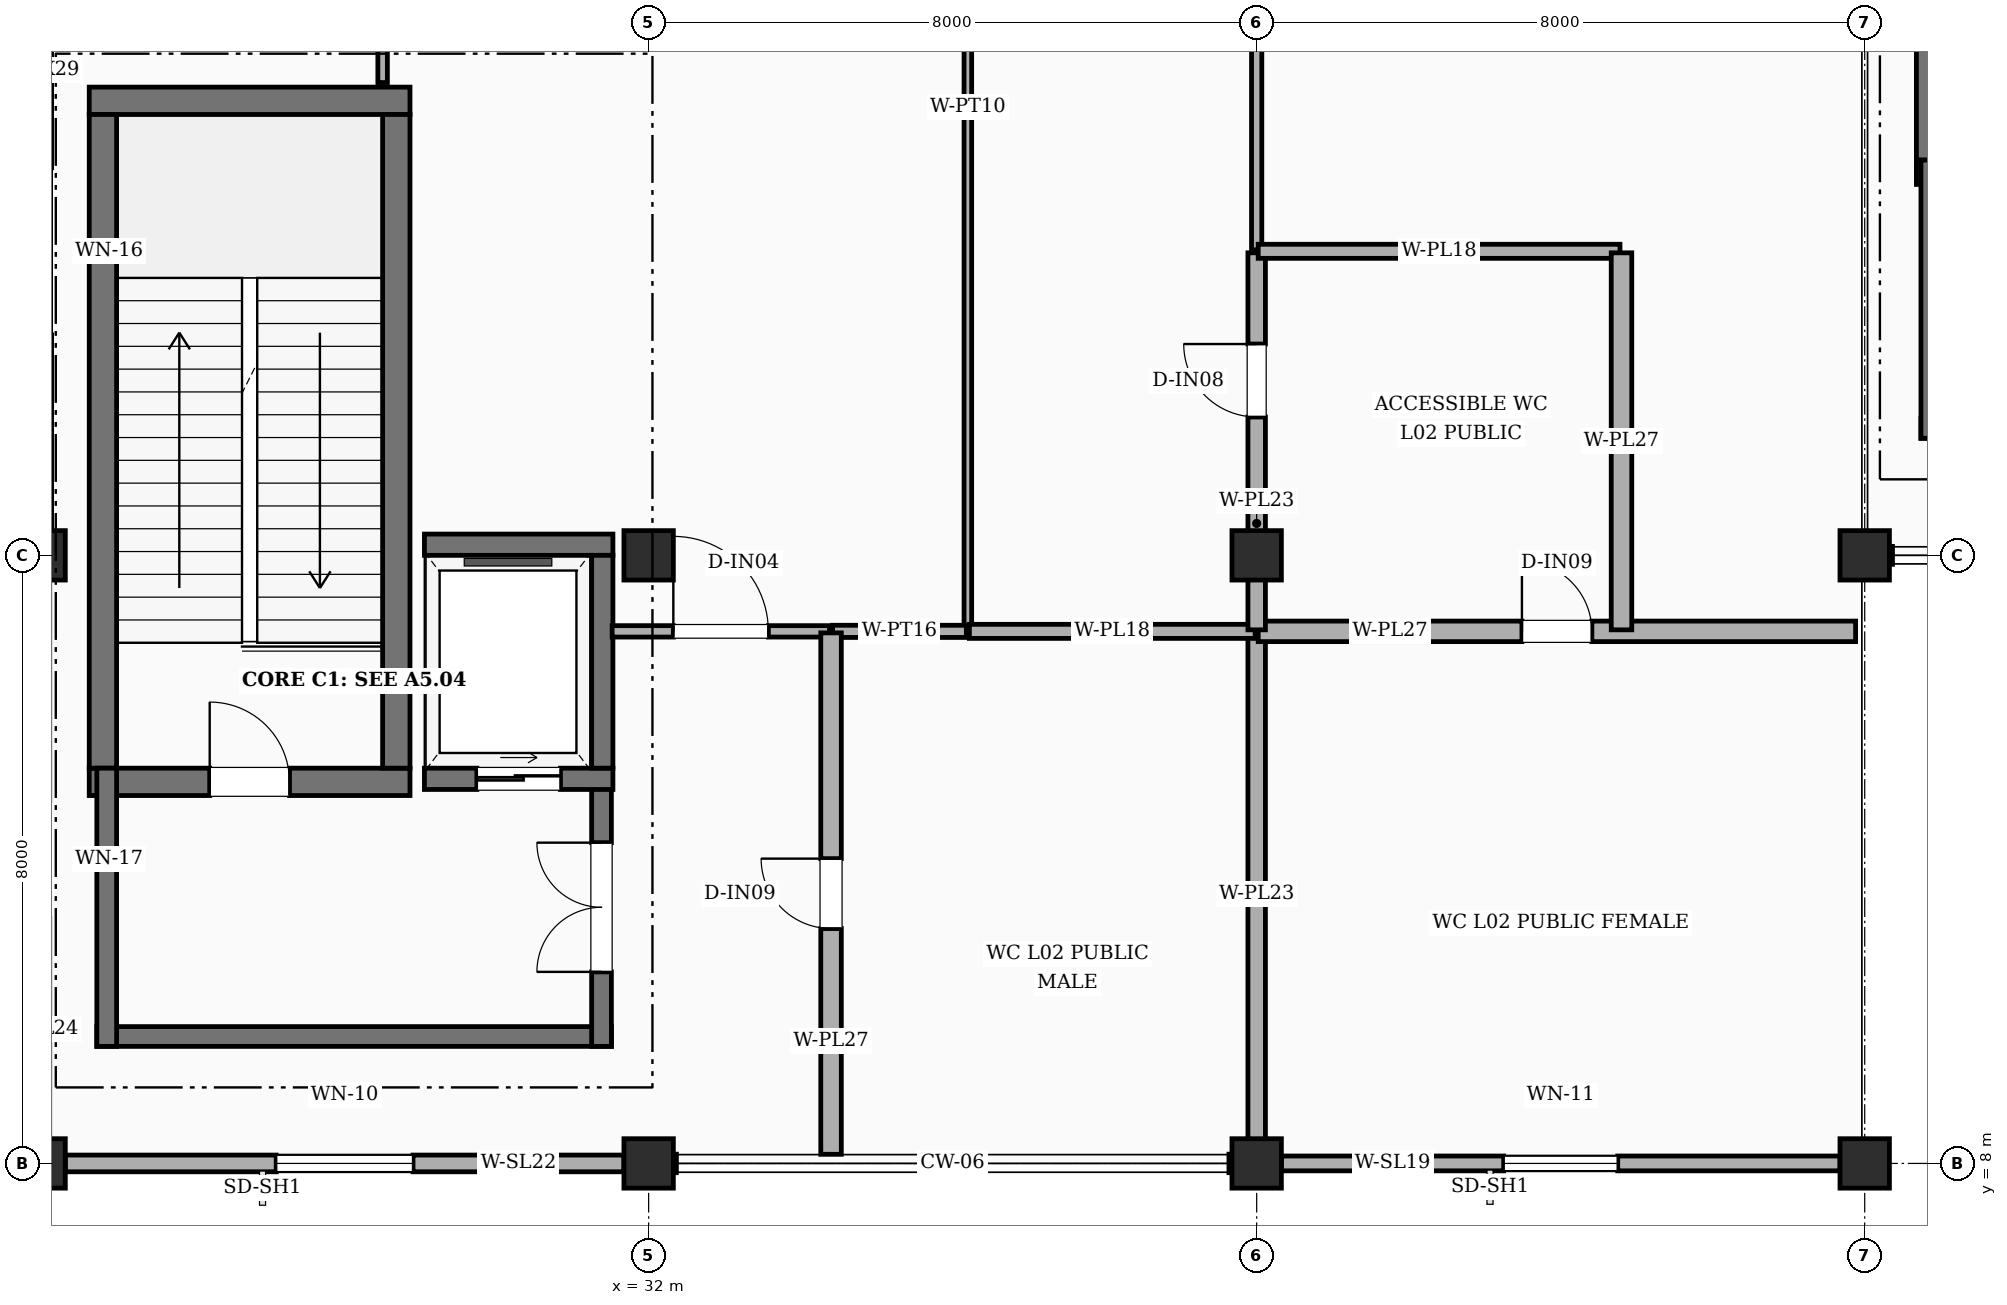
"""IFC4 building model, lengths in metres.
Left out: names, types, materials, properties, quantities, classifications, styles, units other than length and angle.
Written with IfcOpenShell. Run it as: python <this file> out.ifc"""

import sys

from ifc_helpers import new_model, si_unit, direction, frame, frame_2d, origin, origin_2d, place, context, subcontext, project, spatial, rectangle, extrude, element, fill, save


model = new_model("IFC4")
c1 = context("Model", 3, precision=1e-05, world=origin(), true_north=direction((0.0, 1.0)))
c2 = subcontext(c1, "Body", "Model", "MODEL_VIEW")
j1 = project(units=[si_unit("LENGTHUNIT", "METRE"), si_unit("PLANEANGLEUNIT", "RADIAN")], contexts=[c1])
p1 = place(None, origin())
s1 = spatial("IfcSite", under=j1, at=p1, CompositionType="ELEMENT")
p2 = place(p1, origin())
s2 = spatial("IfcBuilding", under=s1, at=p2, CompositionType="ELEMENT")
p3 = place(p2, frame((0.0, 0.0, 10.8)))
s3 = spatial("IfcBuildingStorey", under=s2, at=p3, CompositionType="ELEMENT", Elevation=10.8)
for number, where, z_axis, x_axis in (
    (1, (24.0, 8.0, 0.0), (0.0, 0.0, 1.0), (1.0, 0.0, 0.0)),
    (2, (24.0, 16.0, 0.0), (0.0, 0.0, 1.0), (1.0, 0.0, 0.0)),
    (3, (32.0, 8.0, 0.0), (0.0, 0.0, 1.0), (1.0, 0.0, 0.0)),
    (4, (32.0, 16.0, 0.0), (0.0, 0.0, 1.0), (1.0, 0.0, 0.0)),
    (5, (40.0, 8.0, 0.0), (0.0, 0.0, 1.0), (1.0, 0.0, 0.0)),
    (6, (40.0, 16.0, 0.0), (0.0, 0.0, 1.0), (1.0, 0.0, 0.0)),
    (7, (48.0, 8.0, 0.0), (0.0, 0.0, 1.0), (1.0, 0.0, 0.0)),
    (8, (48.0, 16.0, 0.0), (0.0, 0.0, 1.0), (1.0, 0.0, 0.0)),
):
    element("IfcColumn", number, at=place(p3, frame(where, z_axis=z_axis, x_axis=x_axis)), inside=s3, PredefinedType="COLUMN", context=c2, shape_type="SweptSolid", body=[
        extrude(rectangle(XDim=0.65, YDim=0.65, at=origin_2d()), origin(), (0.0, 0.0, 1.0), 4.2),
    ])
p4 = place(p3, frame((24.325, 8.0, 0.0), z_axis=(0.0, 0.0, 1.0), x_axis=(1.0, 0.0, 0.0)))
e9 = element("IfcWall", 9, at=p4, inside=s3, PredefinedType="SOLIDWALL", context=c2, shape_type="SweptSolid", body=[
    extrude(rectangle(XDim=7.35, YDim=0.22, at=frame_2d((3.675, 0.0))), origin(), (0.0, 0.0, 1.0), 3.464),
])
p5 = place(p4, frame((2.775, 0.0, 0.95)))
e10 = element("IfcOpeningElement", 10, at=p5, cuts=e9, PredefinedType="OPENING", context=c2, shape_type="SweptSolid", body=[
    extrude(rectangle(XDim=1.8, YDim=2.0, at=frame_2d((0.9, 1.0))), frame((0.0, 0.12, 0.0), z_axis=(0.0, -1.0, 0.0), x_axis=(1.0, 0.0, 0.0)), (0.0, 0.0, 1.0), 0.24),
])
p6 = place(p3, frame((40.325, 8.0, 0.0), z_axis=(0.0, 0.0, 1.0), x_axis=(1.0, 0.0, 0.0)))
e11 = element("IfcWall", 11, at=p6, inside=s3, PredefinedType="SOLIDWALL", context=c2, shape_type="SweptSolid", body=[
    extrude(rectangle(XDim=7.35, YDim=0.195, at=frame_2d((3.675, 0.0))), origin(), (0.0, 0.0, 1.0), 3.464),
])
p7 = place(p6, frame((2.925, 0.0, 0.95)))
e12 = element("IfcOpeningElement", 12, at=p7, cuts=e11, PredefinedType="OPENING", context=c2, shape_type="SweptSolid", body=[
    extrude(rectangle(XDim=1.5, YDim=1.8, at=frame_2d((0.75, 0.9))), frame((0.0, 0.107, 0.0), z_axis=(0.0, -1.0, 0.0), x_axis=(1.0, 0.0, 0.0)), (0.0, 0.0, 1.0), 0.215),
])
p8 = place(p3, frame((24.64, 13.02, 0.0), z_axis=(0.0, 0.0, 1.0), x_axis=(1.0, 0.0, 0.0)))
e13 = element("IfcWall", 13, at=p8, inside=s3, PredefinedType="SHEAR", context=c2, shape_type="SweptSolid", body=[
    extrude(rectangle(XDim=4.22, YDim=0.36, at=frame_2d((2.11, 0.0))), origin(), (0.0, 0.0, 1.0), 4.2),
])
p9 = place(p8, frame((1.585, 0.0, 0.0)))
e14 = element("IfcOpeningElement", 14, at=p9, cuts=e13, PredefinedType="OPENING", context=c2, shape_type="SweptSolid", body=[
    extrude(rectangle(XDim=1.05, YDim=2.15, at=frame_2d((0.525, 1.075))), frame((0.0, 0.19, 0.0), z_axis=(0.0, -1.0, 0.0), x_axis=(1.0, 0.0, 0.0)), (0.0, 0.0, 1.0), 0.38),
])
p10 = place(p3, frame((24.64, 21.98, 0.0), z_axis=(0.0, 0.0, 1.0), x_axis=(1.0, 0.0, 0.0)))
e15 = element("IfcWall", 15, at=p10, inside=s3, PredefinedType="SHEAR", context=c2, shape_type="SweptSolid", body=[
    extrude(rectangle(XDim=4.22, YDim=0.36, at=frame_2d((2.11, 0.0))), origin(), (0.0, 0.0, 1.0), 4.2),
])
for number, where, z_axis, x_axis in (
    (16, (24.82, 13.2, 0.0), (0.0, 0.0, 1.0), (0.0, 1.0, 0.0)),
    (17, (28.68, 13.2, 0.0), (0.0, 0.0, 1.0), (0.0, 1.0, 0.0)),
):
    element("IfcWall", number, at=place(p3, frame(where, z_axis=z_axis, x_axis=x_axis)), inside=s3, PredefinedType="SHEAR", context=c2, shape_type="SweptSolid", body=[
        extrude(rectangle(XDim=8.6, YDim=0.36, at=frame_2d((4.3, 0.0))), origin(), (0.0, 0.0, 1.0), 4.2),
    ])
p11 = place(p3, frame((31.51, 9.67, 0.0), z_axis=(0.0, 0.0, 1.0), x_axis=(-1.0, 0.0, 0.0)))
e18 = element("IfcWall", 18, at=p11, inside=s3, PredefinedType="SHEAR", context=c2, shape_type="SweptSolid", body=[
    extrude(rectangle(XDim=6.77, YDim=0.26, at=frame_2d((3.385, 0.0))), origin(), (0.0, 0.0, 1.0), 4.2),
])
p12 = place(p3, frame((24.87, 9.54, 0.0), z_axis=(0.0, 0.0, 1.0), x_axis=(0.0, 1.0, 0.0)))
e19 = element("IfcWall", 19, at=p12, inside=s3, PredefinedType="SHEAR", context=c2, shape_type="SweptSolid", body=[
    extrude(rectangle(XDim=3.66, YDim=0.26, at=frame_2d((1.83, 0.0))), origin(), (0.0, 0.0, 1.0), 4.2),
])
p13 = place(p3, frame((31.38, 9.54, 0.0), z_axis=(0.0, 0.0, 1.0), x_axis=(0.0, 1.0, 0.0)))
e20 = element("IfcWall", 20, at=p13, inside=s3, PredefinedType="SHEAR", context=c2, shape_type="SweptSolid", body=[
    extrude(rectangle(XDim=3.66, YDim=0.26, at=frame_2d((1.83, 0.0))), origin(), (0.0, 0.0, 1.0), 4.2),
])
p14 = place(p13, frame((0.98, 0.0, 0.0)))
e21 = element("IfcOpeningElement", 21, at=p14, cuts=e20, PredefinedType="OPENING", context=c2, shape_type="SweptSolid", body=[
    extrude(rectangle(XDim=1.7, YDim=2.2, at=frame_2d((0.85, 1.1))), frame((0.0, 0.14, 0.0), z_axis=(0.0, -1.0, 0.0), x_axis=(1.0, 0.0, 0.0)), (0.0, 0.0, 1.0), 0.28),
])
p15 = place(p3, frame((29.05, 13.06, 0.0), z_axis=(0.0, 0.0, 1.0), x_axis=(1.0, 0.0, 0.0)))
e22 = element("IfcWall", 22, at=p15, inside=s3, PredefinedType="SHEAR", context=c2, shape_type="SweptSolid", body=[
    extrude(rectangle(XDim=2.48, YDim=0.28, at=frame_2d((1.24, 0.0))), origin(), (0.0, 0.0, 1.0), 4.2),
])
p16 = place(p15, frame((0.69, 0.0, 0.0)))
e23 = element("IfcOpeningElement", 23, at=p16, cuts=e22, PredefinedType="OPENING", context=c2, shape_type="SweptSolid", body=[
    extrude(rectangle(XDim=1.1, YDim=2.15, at=frame_2d((0.55, 1.075))), frame((0.0, 0.15, 0.0), z_axis=(0.0, -1.0, 0.0), x_axis=(1.0, 0.0, 0.0)), (0.0, 0.0, 1.0), 0.3),
])
p17 = place(p3, frame((29.05, 16.14, 0.0), z_axis=(0.0, 0.0, 1.0), x_axis=(1.0, 0.0, 0.0)))
e24 = element("IfcWall", 24, at=p17, inside=s3, PredefinedType="SHEAR", context=c2, shape_type="SweptSolid", body=[
    extrude(rectangle(XDim=2.48, YDim=0.28, at=frame_2d((1.24, 0.0))), origin(), (0.0, 0.0, 1.0), 4.2),
])
p18 = place(p3, frame((31.39, 13.2, 0.0), z_axis=(0.0, 0.0, 1.0), x_axis=(0.0, 1.0, 0.0)))
e25 = element("IfcWall", 25, at=p18, inside=s3, PredefinedType="SHEAR", context=c2, shape_type="SweptSolid", body=[
    extrude(rectangle(XDim=2.8, YDim=0.28, at=frame_2d((1.4, 0.0))), origin(), (0.0, 0.0, 1.0), 4.2),
])
p19 = place(p3, frame((48.68, 21.04, 0.0), z_axis=(0.0, 0.0, 1.0), x_axis=(1.0, 0.0, 0.0)))
e26 = element("IfcWall", 26, at=p19, inside=s3, PredefinedType="SHEAR", context=c2, shape_type="SweptSolid", body=[
    extrude(rectangle(XDim=4.24, YDim=0.32, at=frame_2d((2.12, 0.0))), origin(), (0.0, 0.0, 1.0), 4.2),
])
p20 = place(p19, frame((1.595, 0.0, 0.0)))
e27 = element("IfcOpeningElement", 27, at=p20, cuts=e26, PredefinedType="OPENING", context=c2, shape_type="SweptSolid", body=[
    extrude(rectangle(XDim=1.05, YDim=2.15, at=frame_2d((0.525, 1.075))), frame((0.0, 0.17, 0.0), z_axis=(0.0, -1.0, 0.0), x_axis=(1.0, 0.0, 0.0)), (0.0, 0.0, 1.0), 0.34),
])
p21 = place(p3, frame((48.84, 21.2, 0.0), z_axis=(0.0, 0.0, 1.0), x_axis=(0.0, 1.0, 0.0)))
e28 = element("IfcWall", 28, at=p21, inside=s3, PredefinedType="SHEAR", context=c2, shape_type="SweptSolid", body=[
    extrude(rectangle(XDim=8.6, YDim=0.32, at=frame_2d((4.3, 0.0))), origin(), (0.0, 0.0, 1.0), 4.2),
])
p22 = place(p3, frame((55.56, 17.67, 0.0), z_axis=(0.0, 0.0, 1.0), x_axis=(-1.0, 0.0, 0.0)))
e29 = element("IfcWall", 29, at=p22, inside=s3, PredefinedType="SHEAR", context=c2, shape_type="SweptSolid", body=[
    extrude(rectangle(XDim=6.82, YDim=0.26, at=frame_2d((3.41, 0.0))), origin(), (0.0, 0.0, 1.0), 4.2),
])
p23 = place(p3, frame((48.87, 17.54, 0.0), z_axis=(0.0, 0.0, 1.0), x_axis=(0.0, 1.0, 0.0)))
e30 = element("IfcWall", 30, at=p23, inside=s3, PredefinedType="SHEAR", context=c2, shape_type="SweptSolid", body=[
    extrude(rectangle(XDim=3.66, YDim=0.26, at=frame_2d((1.83, 0.0))), origin(), (0.0, 0.0, 1.0), 4.2),
])
p24 = place(p3, frame((28.5, 22.22, 0.0), z_axis=(0.0, 0.0, 1.0), x_axis=(0.0, 1.0, 0.0)))
e31 = element("IfcWall", 31, at=p24, inside=s3, PredefinedType="PARTITIONING", context=c2, shape_type="SweptSolid", body=[
    extrude(rectangle(XDim=33.76, YDim=0.125, at=frame_2d((16.88, 0.0))), origin(), (0.0, 0.0, 1.0), 3.464),
])
p25 = place(p24, frame((16.155, 0.0, 0.0)))
e32 = element("IfcOpeningElement", 32, at=p25, cuts=e31, PredefinedType="OPENING", context=c2, shape_type="SweptSolid", body=[
    extrude(rectangle(XDim=1.45, YDim=2.2, at=frame_2d((0.725, 1.1))), frame((0.0, 0.073, 0.0), z_axis=(0.0, -1.0, 0.0), x_axis=(1.0, 0.0, 0.0)), (0.0, 0.0, 1.0), 0.145),
])
p26 = place(p3, frame((36.2, 15.02, 0.0), z_axis=(0.0, 0.0, 1.0), x_axis=(0.0, 1.0, 0.0)))
e33 = element("IfcWall", 33, at=p26, inside=s3, PredefinedType="PARTITIONING", context=c2, shape_type="SweptSolid", body=[
    extrude(rectangle(XDim=28.96, YDim=0.1, at=frame_2d((14.48, 0.0))), origin(), (0.0, 0.0, 1.0), 3.88),
])
p27 = place(p26, frame((13.755, 0.0, 0.0)))
e34 = element("IfcOpeningElement", 34, at=p27, cuts=e33, PredefinedType="OPENING", context=c2, shape_type="SweptSolid", body=[
    extrude(rectangle(XDim=1.45, YDim=2.2, at=frame_2d((0.725, 1.1))), frame((0.0, 0.06, 0.0), z_axis=(0.0, -1.0, 0.0), x_axis=(1.0, 0.0, 0.0)), (0.0, 0.0, 1.0), 0.12),
])
p28 = place(p3, frame((34.42, 15.0, 0.0), z_axis=(0.0, 0.0, 1.0), x_axis=(1.0, 0.0, 0.0)))
e35 = element("IfcWall", 35, at=p28, inside=s3, PredefinedType="PARTITIONING", context=c2, shape_type="SweptSolid", body=[
    extrude(rectangle(XDim=1.76, YDim=0.16, at=frame_2d((0.88, 0.0))), origin(), (0.0, 0.0, 1.0), 3.88),
])
p29 = place(p3, frame((31.52, 15.0, 0.0), z_axis=(0.0, 0.0, 1.0), x_axis=(1.0, 0.0, 0.0)))
e36 = element("IfcWall", 36, at=p29, inside=s3, PredefinedType="PARTITIONING", context=c2, shape_type="SweptSolid", body=[
    extrude(rectangle(XDim=2.86, YDim=0.15, at=frame_2d((1.43, 0.0))), origin(), (0.0, 0.0, 1.0), 3.36),
])
p30 = place(p29, frame((0.805, 0.0, 0.0)))
e37 = element("IfcOpeningElement", 37, at=p30, cuts=e36, PredefinedType="OPENING", context=c2, shape_type="SweptSolid", body=[
    extrude(rectangle(XDim=1.25, YDim=2.15, at=frame_2d((0.625, 1.075))), frame((0.0, 0.085, 0.0), z_axis=(0.0, -1.0, 0.0), x_axis=(1.0, 0.0, 0.0)), (0.0, 0.0, 1.0), 0.17),
])
p31 = place(p3, frame((40.0, 20.02, 0.0), z_axis=(0.0, 0.0, 1.0), x_axis=(0.0, 1.0, 0.0)))
e38 = element("IfcWall", 38, at=p31, inside=s3, PredefinedType="PARTITIONING", context=c2, shape_type="SweptSolid", body=[
    extrude(rectangle(XDim=20.96, YDim=0.135, at=frame_2d((10.48, 0.0))), origin(), (0.0, 0.0, 1.0), 3.36),
])
p32 = place(p31, frame((7.49, 0.0, 0.0)))
e39 = element("IfcOpeningElement", 39, at=p32, cuts=e38, PredefinedType="OPENING", context=c2, shape_type="SweptSolid", body=[
    extrude(rectangle(XDim=1.25, YDim=2.15, at=frame_2d((0.625, 1.075))), frame((0.0, 0.077, 0.0), z_axis=(0.0, -1.0, 0.0), x_axis=(1.0, 0.0, 0.0)), (0.0, 0.0, 1.0), 0.155),
])
p33 = place(p3, frame((34.4, 8.12, 0.0), z_axis=(0.0, 0.0, 1.0), x_axis=(0.0, 1.0, 0.0)))
e40 = element("IfcWall", 40, at=p33, inside=s3, PredefinedType="PLUMBINGWALL", context=c2, shape_type="SweptSolid", body=[
    extrude(rectangle(XDim=6.86, YDim=0.27, at=frame_2d((3.43, 0.0))), origin(), (0.0, 0.0, 1.0), 3.88),
])
p34 = place(p33, frame((2.97, 0.0, 0.0)))
e41 = element("IfcOpeningElement", 41, at=p34, cuts=e40, PredefinedType="OPENING", context=c2, shape_type="SweptSolid", body=[
    extrude(rectangle(XDim=0.92, YDim=2.1, at=frame_2d((0.46, 1.05))), frame((0.0, 0.145, 0.0), z_axis=(0.0, -1.0, 0.0), x_axis=(1.0, 0.0, 0.0)), (0.0, 0.0, 1.0), 0.29),
])
p35 = place(p3, frame((40.0, 8.12, 0.0), z_axis=(0.0, 0.0, 1.0), x_axis=(0.0, 1.0, 0.0)))
e42 = element("IfcWall", 42, at=p35, inside=s3, PredefinedType="PLUMBINGWALL", context=c2, shape_type="SweptSolid", body=[
    extrude(rectangle(XDim=6.86, YDim=0.23, at=frame_2d((3.43, 0.0))), origin(), (0.0, 0.0, 1.0), 3.36),
])
p36 = place(p3, frame((36.22, 15.0, 0.0), z_axis=(0.0, 0.0, 1.0), x_axis=(1.0, 0.0, 0.0)))
e43 = element("IfcWall", 43, at=p36, inside=s3, PredefinedType="PLUMBINGWALL", context=c2, shape_type="SweptSolid", body=[
    extrude(rectangle(XDim=3.76, YDim=0.185, at=frame_2d((1.88, 0.0))), origin(), (0.0, 0.0, 1.0), 3.36),
])
p37 = place(p3, frame((40.02, 15.0, 0.0), z_axis=(0.0, 0.0, 1.0), x_axis=(1.0, 0.0, 0.0)))
e44 = element("IfcWall", 44, at=p37, inside=s3, PredefinedType="PLUMBINGWALL", context=c2, shape_type="SweptSolid", body=[
    extrude(rectangle(XDim=7.86, YDim=0.27, at=frame_2d((3.93, 0.0))), origin(), (0.0, 0.0, 1.0), 3.36),
])
p38 = place(p37, frame((3.47, 0.0, 0.0)))
e45 = element("IfcOpeningElement", 45, at=p38, cuts=e44, PredefinedType="OPENING", context=c2, shape_type="SweptSolid", body=[
    extrude(rectangle(XDim=0.92, YDim=2.1, at=frame_2d((0.46, 1.05))), frame((0.0, 0.145, 0.0), z_axis=(0.0, -1.0, 0.0), x_axis=(1.0, 0.0, 0.0)), (0.0, 0.0, 1.0), 0.29),
])
p39 = place(p3, frame((40.0, 15.02, 0.0), z_axis=(0.0, 0.0, 1.0), x_axis=(0.0, 1.0, 0.0)))
e46 = element("IfcWall", 46, at=p39, inside=s3, PredefinedType="PLUMBINGWALL", context=c2, shape_type="SweptSolid", body=[
    extrude(rectangle(XDim=4.96, YDim=0.23, at=frame_2d((2.48, 0.0))), origin(), (0.0, 0.0, 1.0), 3.36),
])
p40 = place(p39, frame((2.8, 0.0, 0.0)))
e47 = element("IfcOpeningElement", 47, at=p40, cuts=e46, PredefinedType="OPENING", context=c2, shape_type="SweptSolid", body=[
    extrude(rectangle(XDim=0.96, YDim=2.1, at=frame_2d((0.48, 1.05))), frame((0.0, 0.125, 0.0), z_axis=(0.0, -1.0, 0.0), x_axis=(1.0, 0.0, 0.0)), (0.0, 0.0, 1.0), 0.25),
])
p41 = place(p3, frame((40.02, 20.0, 0.0), z_axis=(0.0, 0.0, 1.0), x_axis=(1.0, 0.0, 0.0)))
e48 = element("IfcWall", 48, at=p41, inside=s3, PredefinedType="PLUMBINGWALL", context=c2, shape_type="SweptSolid", body=[
    extrude(rectangle(XDim=4.76, YDim=0.185, at=frame_2d((2.38, 0.0))), origin(), (0.0, 0.0, 1.0), 3.36),
])
p42 = place(p3, frame((44.8, 15.02, 0.0), z_axis=(0.0, 0.0, 1.0), x_axis=(0.0, 1.0, 0.0)))
e49 = element("IfcWall", 49, at=p42, inside=s3, PredefinedType="PLUMBINGWALL", context=c2, shape_type="SweptSolid", body=[
    extrude(rectangle(XDim=4.96, YDim=0.27, at=frame_2d((2.48, 0.0))), origin(), (0.0, 0.0, 1.0), 3.464),
])
p43 = place(p5, origin())
e50 = element("IfcWindow", 50, at=p43, inside=s3, PartitioningType="SINGLE_PANEL", PredefinedType="WINDOW", context=c2, shape_type="SweptSolid", body=[
    extrude(rectangle(XDim=1.8, YDim=2.0, at=frame_2d((0.9, 1.0))), frame((0.0, 0.03, 0.0), z_axis=(0.0, -1.0, 0.0), x_axis=(1.0, 0.0, 0.0)), (0.0, 0.0, 1.0), 0.06),
])
fill(e10, e50)
p44 = place(p7, origin())
e51 = element("IfcWindow", 51, at=p44, inside=s3, PartitioningType="SINGLE_PANEL", PredefinedType="WINDOW", context=c2, shape_type="SweptSolid", body=[
    extrude(rectangle(XDim=1.5, YDim=1.8, at=frame_2d((0.75, 0.9))), frame((0.0, 0.03, 0.0), z_axis=(0.0, -1.0, 0.0), x_axis=(1.0, 0.0, 0.0)), (0.0, 0.0, 1.0), 0.06),
])
fill(e12, e51)
p45 = place(p9, origin())
e52 = element("IfcDoor", 52, at=p45, inside=s3, OperationType="SINGLE_SWING_LEFT", PredefinedType="DOOR", context=c2, shape_type="SweptSolid", body=[
    extrude(rectangle(XDim=1.05, YDim=2.15, at=frame_2d((0.525, 1.075))), frame((0.0, 0.025, 0.0), z_axis=(0.0, -1.0, 0.0), x_axis=(1.0, 0.0, 0.0)), (0.0, 0.0, 1.0), 0.05),
])
fill(e14, e52)
p46 = place(p14, origin())
e53 = element("IfcDoor", 53, at=p46, inside=s3, OperationType="DOUBLE_DOOR_SINGLE_SWING", PredefinedType="DOOR", context=c2, shape_type="SweptSolid", body=[
    extrude(rectangle(XDim=1.7, YDim=2.2, at=frame_2d((0.85, 1.1))), frame((0.0, 0.025, 0.0), z_axis=(0.0, -1.0, 0.0), x_axis=(1.0, 0.0, 0.0)), (0.0, 0.0, 1.0), 0.05),
])
fill(e21, e53)
p47 = place(p16, origin())
e54 = element("IfcDoor", 54, at=p47, inside=s3, OperationType="SLIDING_TO_LEFT", PredefinedType="DOOR", context=c2, shape_type="SweptSolid", body=[
    extrude(rectangle(XDim=1.1, YDim=2.15, at=frame_2d((0.55, 1.075))), frame((0.0, 0.025, 0.0), z_axis=(0.0, -1.0, 0.0), x_axis=(1.0, 0.0, 0.0)), (0.0, 0.0, 1.0), 0.05),
])
fill(e23, e54)
p48 = place(p30, origin())
e55 = element("IfcDoor", 55, at=p48, inside=s3, OperationType="SINGLE_SWING_LEFT", PredefinedType="DOOR", context=c2, shape_type="SweptSolid", body=[
    extrude(rectangle(XDim=1.25, YDim=2.15, at=frame_2d((0.625, 1.075))), frame((0.0, 0.025, 0.0), z_axis=(0.0, -1.0, 0.0), x_axis=(1.0, 0.0, 0.0)), (0.0, 0.0, 1.0), 0.05),
])
fill(e37, e55)
p49 = place(p34, origin())
e56 = element("IfcDoor", 56, at=p49, inside=s3, OperationType="SINGLE_SWING_RIGHT", PredefinedType="DOOR", context=c2, shape_type="SweptSolid", body=[
    extrude(rectangle(XDim=0.92, YDim=2.1, at=frame_2d((0.46, 1.05))), frame((0.0, 0.025, 0.0), z_axis=(0.0, -1.0, 0.0), x_axis=(1.0, 0.0, 0.0)), (0.0, 0.0, 1.0), 0.05),
])
fill(e41, e56)
p50 = place(p38, origin())
e57 = element("IfcDoor", 57, at=p50, inside=s3, OperationType="SINGLE_SWING_LEFT", PredefinedType="DOOR", context=c2, shape_type="SweptSolid", body=[
    extrude(rectangle(XDim=0.92, YDim=2.1, at=frame_2d((0.46, 1.05))), frame((0.0, 0.025, 0.0), z_axis=(0.0, -1.0, 0.0), x_axis=(1.0, 0.0, 0.0)), (0.0, 0.0, 1.0), 0.05),
])
fill(e45, e57)
p51 = place(p40, origin())
e58 = element("IfcDoor", 58, at=p51, inside=s3, OperationType="SINGLE_SWING_RIGHT", PredefinedType="DOOR", context=c2, shape_type="SweptSolid", body=[
    extrude(rectangle(XDim=0.96, YDim=2.1, at=frame_2d((0.48, 1.05))), frame((0.0, 0.025, 0.0), z_axis=(0.0, -1.0, 0.0), x_axis=(1.0, 0.0, 0.0)), (0.0, 0.0, 1.0), 0.05),
])
fill(e47, e58)
save(model, sys.argv[1])
